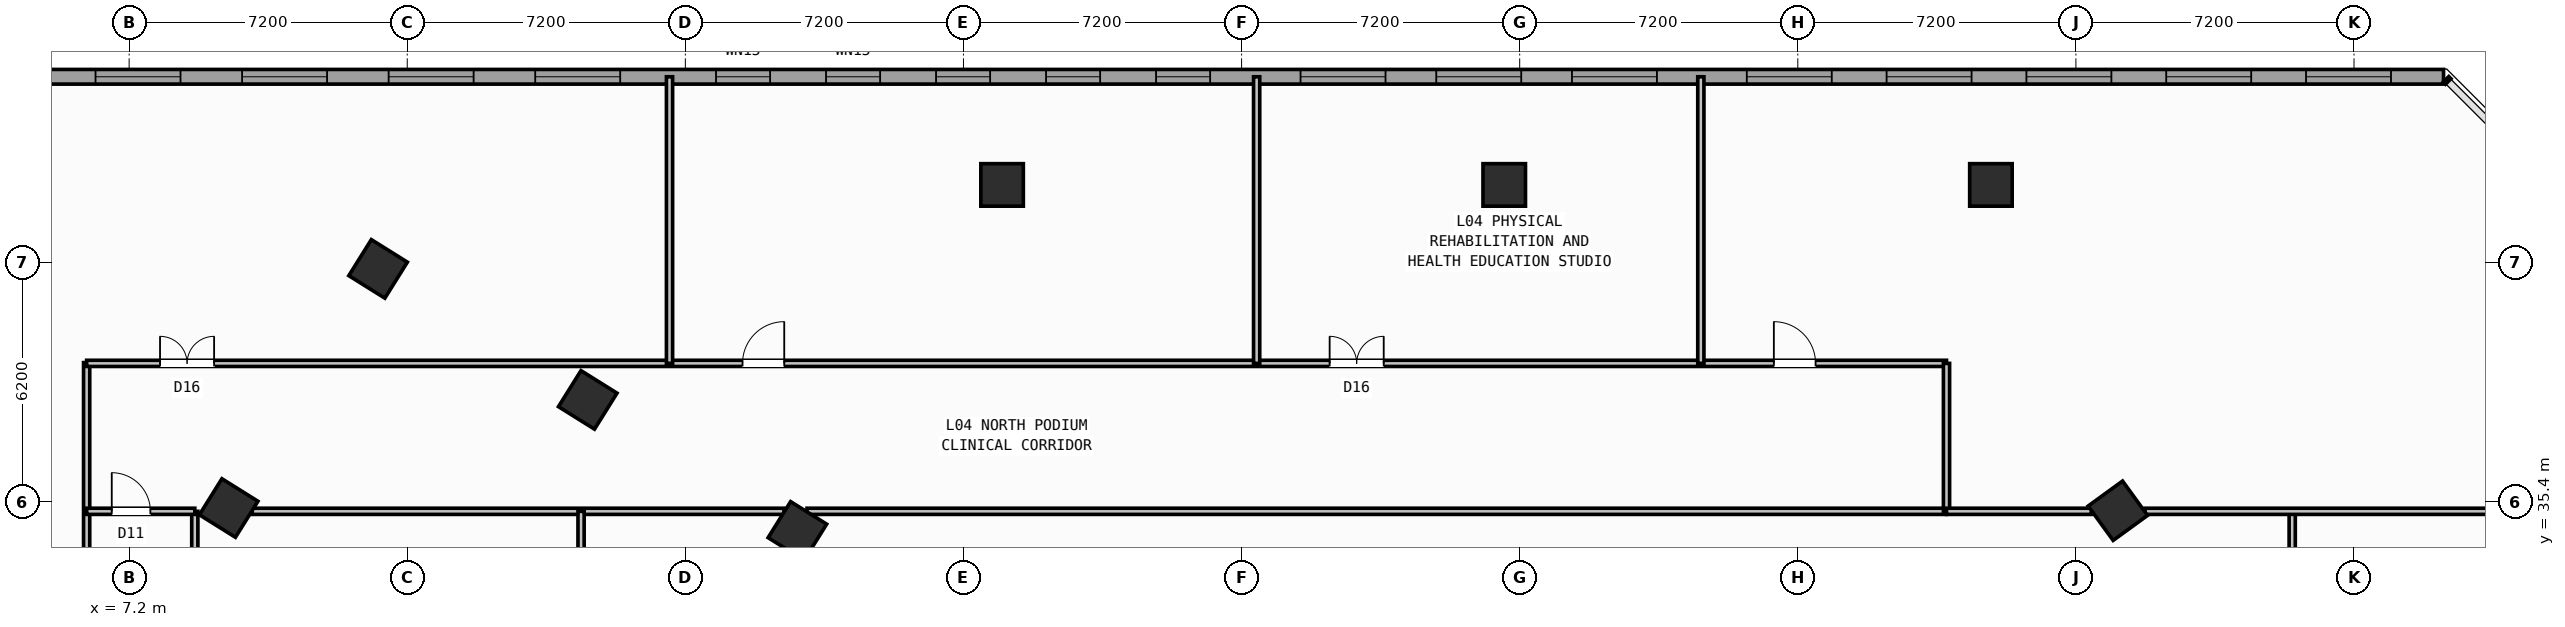
"""IFC4 building model, lengths in metres.
Left out: names, types, materials, properties, quantities, classifications, styles, units other than length and angle.
Written with IfcOpenShell. Run it as: python <this file> out.ifc"""

import sys

from ifc_helpers import new_model, si_unit, direction, frame, frame_2d, origin, origin_2d, place, context, subcontext, project, spatial, rectangle, hollow_rectangle, extrude, source, transform, mapped, element, fill, save


model = new_model("IFC4")
c1 = context("Model", 3, precision=1e-05, world=origin(), true_north=direction((0.0, 1.0)))
c2 = subcontext(c1, "Body", "Model", "MODEL_VIEW")
j1 = project(units=[si_unit("LENGTHUNIT", "METRE"), si_unit("PLANEANGLEUNIT", "RADIAN")], contexts=[c1])
p1 = place(None, origin())
s1 = spatial("IfcSite", under=j1, at=p1, CompositionType="ELEMENT")
p2 = place(p1, origin())
s2 = spatial("IfcBuilding", under=s1, at=p2, CompositionType="ELEMENT")
p3 = place(p2, frame((0.0, 0.0, 18.6)))
s3 = spatial("IfcBuildingStorey", under=s2, at=p3, CompositionType="ELEMENT", Elevation=18.6)
m1 = source(origin(), c2, "Body", "SweptSolid", [
    extrude(hollow_rectangle(XDim=1.1, YDim=1.1, WallThickness=0.04, at=origin_2d()), origin(), (0.0, 0.0, 1.0), 5.4),
])
for number, where, z_axis, x_axis in (
    (1, (29.8, 43.6, 0.0), (0.0, 0.0, 1.0), (1.0, 0.0, 0.0)),
    (2, (42.8, 43.6, 0.0), (0.0, 0.0, 1.0), (1.0, 0.0, 0.0)),
    (3, (55.4, 43.6, 0.0), (0.0, 0.0, 1.0), (1.0, 0.0, 0.0)),
    (4, (24.5, 34.643, 0.0), (0.0, 0.0, 1.0), (-0.848, 0.53, 0.0)),
    (5, (19.073, 38.034, 0.0), (0.0, 0.0, 1.0), (-0.848, 0.53, 0.0)),
    (6, (13.646, 41.426, 0.0), (0.0, 0.0, 1.0), (-0.848, 0.53, 0.0)),
    (7, (9.777, 35.235, 0.0), (0.0, 0.0, 1.0), (-0.848, 0.53, 0.0)),
    (8, (58.686, 35.165, 0.0), (0.0, 0.0, 1.0), (0.809, 0.588, 0.0)),
):
    element("IfcColumn", number, at=place(p3, frame(where, z_axis=z_axis, x_axis=x_axis)), inside=s3, PredefinedType="COLUMN", context=c2, shape_type="MappedRepresentation", body=[
        mapped(m1, transform((0.0, 0.0, 0.0), scale=1.0)),
    ])
p4 = place(p3, frame((4.883, 46.4, 0.0), z_axis=(0.0, 0.0, 1.0), x_axis=(1.0, 0.0, 0.0)))
e9 = element("IfcWall", 9, at=p4, inside=s3, PredefinedType="STANDARD", context=c2, shape_type="SweptSolid", body=[
    extrude(rectangle(XDim=62.234, YDim=0.38, at=frame_2d((31.117, 0.0))), origin(), (0.0, 0.0, 1.0), 4.95),
])
p5 = place(p4, frame((1.447, 0.0, 0.85)))
e10 = element("IfcOpeningElement", 10, at=p5, cuts=e9, PredefinedType="OPENING", context=c2, shape_type="SweptSolid", body=[
    extrude(rectangle(XDim=2.2, YDim=1.75, at=frame_2d((1.1, 0.875))), frame((0.0, 0.2, 0.0), z_axis=(0.0, -1.0, 0.0), x_axis=(1.0, 0.0, 0.0)), (0.0, 0.0, 1.0), 0.4),
])
p6 = place(p4, frame((5.241, 0.0, 0.85)))
e11 = element("IfcOpeningElement", 11, at=p6, cuts=e9, PredefinedType="OPENING", context=c2, shape_type="SweptSolid", body=[
    extrude(rectangle(XDim=2.2, YDim=1.75, at=frame_2d((1.1, 0.875))), frame((0.0, 0.2, 0.0), z_axis=(0.0, -1.0, 0.0), x_axis=(1.0, 0.0, 0.0)), (0.0, 0.0, 1.0), 0.4),
])
p7 = place(p4, frame((9.036, 0.0, 0.85)))
e12 = element("IfcOpeningElement", 12, at=p7, cuts=e9, PredefinedType="OPENING", context=c2, shape_type="SweptSolid", body=[
    extrude(rectangle(XDim=2.2, YDim=1.75, at=frame_2d((1.1, 0.875))), frame((0.0, 0.2, 0.0), z_axis=(0.0, -1.0, 0.0), x_axis=(1.0, 0.0, 0.0)), (0.0, 0.0, 1.0), 0.4),
])
p8 = place(p4, frame((12.83, 0.0, 0.85)))
e13 = element("IfcOpeningElement", 13, at=p8, cuts=e9, PredefinedType="OPENING", context=c2, shape_type="SweptSolid", body=[
    extrude(rectangle(XDim=2.2, YDim=1.75, at=frame_2d((1.1, 0.875))), frame((0.0, 0.2, 0.0), z_axis=(0.0, -1.0, 0.0), x_axis=(1.0, 0.0, 0.0)), (0.0, 0.0, 1.0), 0.4),
])
p9 = place(p4, frame((17.511, 0.0, 0.95)))
e14 = element("IfcOpeningElement", 14, at=p9, cuts=e9, PredefinedType="OPENING", context=c2, shape_type="SweptSolid", body=[
    extrude(rectangle(XDim=1.4, YDim=1.5, at=frame_2d((0.7, 0.75))), frame((0.0, 0.2, 0.0), z_axis=(0.0, -1.0, 0.0), x_axis=(1.0, 0.0, 0.0)), (0.0, 0.0, 1.0), 0.4),
])
p10 = place(p4, frame((20.359, 0.0, 0.95)))
e15 = element("IfcOpeningElement", 15, at=p10, cuts=e9, PredefinedType="OPENING", context=c2, shape_type="SweptSolid", body=[
    extrude(rectangle(XDim=1.4, YDim=1.5, at=frame_2d((0.7, 0.75))), frame((0.0, 0.2, 0.0), z_axis=(0.0, -1.0, 0.0), x_axis=(1.0, 0.0, 0.0)), (0.0, 0.0, 1.0), 0.4),
])
p11 = place(p4, frame((23.207, 0.0, 0.95)))
e16 = element("IfcOpeningElement", 16, at=p11, cuts=e9, PredefinedType="OPENING", context=c2, shape_type="SweptSolid", body=[
    extrude(rectangle(XDim=1.4, YDim=1.5, at=frame_2d((0.7, 0.75))), frame((0.0, 0.2, 0.0), z_axis=(0.0, -1.0, 0.0), x_axis=(1.0, 0.0, 0.0)), (0.0, 0.0, 1.0), 0.4),
])
p12 = place(p4, frame((26.055, 0.0, 0.95)))
e17 = element("IfcOpeningElement", 17, at=p12, cuts=e9, PredefinedType="OPENING", context=c2, shape_type="SweptSolid", body=[
    extrude(rectangle(XDim=1.4, YDim=1.5, at=frame_2d((0.7, 0.75))), frame((0.0, 0.2, 0.0), z_axis=(0.0, -1.0, 0.0), x_axis=(1.0, 0.0, 0.0)), (0.0, 0.0, 1.0), 0.4),
])
p13 = place(p4, frame((28.903, 0.0, 0.95)))
e18 = element("IfcOpeningElement", 18, at=p13, cuts=e9, PredefinedType="OPENING", context=c2, shape_type="SweptSolid", body=[
    extrude(rectangle(XDim=1.4, YDim=1.5, at=frame_2d((0.7, 0.75))), frame((0.0, 0.2, 0.0), z_axis=(0.0, -1.0, 0.0), x_axis=(1.0, 0.0, 0.0)), (0.0, 0.0, 1.0), 0.4),
])
p14 = place(p4, frame((32.644, 0.0, 0.85)))
e19 = element("IfcOpeningElement", 19, at=p14, cuts=e9, PredefinedType="OPENING", context=c2, shape_type="SweptSolid", body=[
    extrude(rectangle(XDim=2.2, YDim=1.75, at=frame_2d((1.1, 0.875))), frame((0.0, 0.2, 0.0), z_axis=(0.0, -1.0, 0.0), x_axis=(1.0, 0.0, 0.0)), (0.0, 0.0, 1.0), 0.4),
])
p15 = place(p4, frame((36.157, 0.0, 0.85)))
e20 = element("IfcOpeningElement", 20, at=p15, cuts=e9, PredefinedType="OPENING", context=c2, shape_type="SweptSolid", body=[
    extrude(rectangle(XDim=2.2, YDim=1.75, at=frame_2d((1.1, 0.875))), frame((0.0, 0.2, 0.0), z_axis=(0.0, -1.0, 0.0), x_axis=(1.0, 0.0, 0.0)), (0.0, 0.0, 1.0), 0.4),
])
p16 = place(p4, frame((39.67, 0.0, 0.85)))
e21 = element("IfcOpeningElement", 21, at=p16, cuts=e9, PredefinedType="OPENING", context=c2, shape_type="SweptSolid", body=[
    extrude(rectangle(XDim=2.2, YDim=1.75, at=frame_2d((1.1, 0.875))), frame((0.0, 0.2, 0.0), z_axis=(0.0, -1.0, 0.0), x_axis=(1.0, 0.0, 0.0)), (0.0, 0.0, 1.0), 0.4),
])
p17 = place(p4, frame((44.197, 0.0, 0.85)))
e22 = element("IfcOpeningElement", 22, at=p17, cuts=e9, PredefinedType="OPENING", context=c2, shape_type="SweptSolid", body=[
    extrude(rectangle(XDim=2.2, YDim=1.75, at=frame_2d((1.1, 0.875))), frame((0.0, 0.2, 0.0), z_axis=(0.0, -1.0, 0.0), x_axis=(1.0, 0.0, 0.0)), (0.0, 0.0, 1.0), 0.4),
])
p18 = place(p4, frame((47.816, 0.0, 0.85)))
e23 = element("IfcOpeningElement", 23, at=p18, cuts=e9, PredefinedType="OPENING", context=c2, shape_type="SweptSolid", body=[
    extrude(rectangle(XDim=2.2, YDim=1.75, at=frame_2d((1.1, 0.875))), frame((0.0, 0.2, 0.0), z_axis=(0.0, -1.0, 0.0), x_axis=(1.0, 0.0, 0.0)), (0.0, 0.0, 1.0), 0.4),
])
p19 = place(p4, frame((51.436, 0.0, 0.85)))
e24 = element("IfcOpeningElement", 24, at=p19, cuts=e9, PredefinedType="OPENING", context=c2, shape_type="SweptSolid", body=[
    extrude(rectangle(XDim=2.2, YDim=1.75, at=frame_2d((1.1, 0.875))), frame((0.0, 0.2, 0.0), z_axis=(0.0, -1.0, 0.0), x_axis=(1.0, 0.0, 0.0)), (0.0, 0.0, 1.0), 0.4),
])
p20 = place(p4, frame((55.055, 0.0, 0.85)))
e25 = element("IfcOpeningElement", 25, at=p20, cuts=e9, PredefinedType="OPENING", context=c2, shape_type="SweptSolid", body=[
    extrude(rectangle(XDim=2.2, YDim=1.75, at=frame_2d((1.1, 0.875))), frame((0.0, 0.2, 0.0), z_axis=(0.0, -1.0, 0.0), x_axis=(1.0, 0.0, 0.0)), (0.0, 0.0, 1.0), 0.4),
])
p21 = place(p4, frame((58.675, 0.0, 0.85)))
e26 = element("IfcOpeningElement", 26, at=p21, cuts=e9, PredefinedType="OPENING", context=c2, shape_type="SweptSolid", body=[
    extrude(rectangle(XDim=2.2, YDim=1.75, at=frame_2d((1.1, 0.875))), frame((0.0, 0.2, 0.0), z_axis=(0.0, -1.0, 0.0), x_axis=(1.0, 0.0, 0.0)), (0.0, 0.0, 1.0), 0.4),
])
p22 = place(p3, frame((6.1, 29.587, 0.0), z_axis=(0.0, 0.0, 1.0), x_axis=(0.0, 1.0, 0.0)))
e27 = element("IfcWall", 27, at=p22, inside=s3, PredefinedType="PARTITIONING", context=c2, shape_type="SweptSolid", body=[
    extrude(rectangle(XDim=9.413, YDim=0.16, at=frame_2d((4.706, 0.0))), origin(), (0.0, 0.0, 1.0), 4.94),
])
p23 = place(p3, frame((8.9, 9.58, 0.0), z_axis=(0.0, 0.0, 1.0), x_axis=(0.0, 1.0, 0.0)))
e28 = element("IfcWall", 28, at=p23, inside=s3, PredefinedType="PARTITIONING", context=c2, shape_type="SweptSolid", body=[
    extrude(rectangle(XDim=25.57, YDim=0.16, at=frame_2d((12.785, 0.0))), origin(), (0.0, 0.0, 1.0), 4.94),
])
p24 = place(p3, frame((10.386, 35.15, 0.0), z_axis=(0.0, 0.0, 1.0), x_axis=(1.0, 0.0, 0.0)))
e29 = element("IfcWall", 29, at=p24, inside=s3, PredefinedType="PARTITIONING", context=c2, shape_type="SweptSolid", body=[
    extrude(rectangle(XDim=13.768, YDim=0.16, at=frame_2d((6.884, 0.0))), origin(), (0.0, 0.0, 1.0), 4.94),
])
p25 = place(p3, frame((24.749, 35.15, 0.0), z_axis=(0.0, 0.0, 1.0), x_axis=(1.0, 0.0, 0.0)))
e30 = element("IfcWall", 30, at=p25, inside=s3, PredefinedType="PARTITIONING", context=c2, shape_type="SweptSolid", body=[
    extrude(rectangle(XDim=29.501, YDim=0.16, at=frame_2d((14.75, 0.0))), origin(), (0.0, 0.0, 1.0), 4.94),
])
p26 = place(p3, frame((6.1, 38.98, 0.0), z_axis=(0.0, 0.0, 1.0), x_axis=(1.0, 0.0, 0.0)))
e31 = element("IfcWall", 31, at=p26, inside=s3, PredefinedType="PARTITIONING", context=c2, shape_type="SweptSolid", body=[
    extrude(rectangle(XDim=48.15, YDim=0.16, at=frame_2d((24.075, 0.0))), origin(), (0.0, 0.0, 1.0), 4.94),
])
p27 = place(p26, frame((1.9, 0.0, 0.0)))
e32 = element("IfcOpeningElement", 32, at=p27, cuts=e31, PredefinedType="OPENING", context=c2, shape_type="SweptSolid", body=[
    extrude(rectangle(XDim=1.4, YDim=2.15, at=frame_2d((0.7, 1.075))), frame((0.0, 0.09, 0.0), z_axis=(0.0, -1.0, 0.0), x_axis=(1.0, 0.0, 0.0)), (0.0, 0.0, 1.0), 0.18),
])
p28 = place(p26, frame((16.98, 0.0, 0.0)))
e33 = element("IfcOpeningElement", 33, at=p28, cuts=e31, PredefinedType="OPENING", context=c2, shape_type="SweptSolid", body=[
    extrude(rectangle(XDim=1.08, YDim=2.15, at=frame_2d((0.54, 1.075))), frame((0.0, 0.09, 0.0), z_axis=(0.0, -1.0, 0.0), x_axis=(1.0, 0.0, 0.0)), (0.0, 0.0, 1.0), 0.18),
])
p29 = place(p26, frame((32.18, 0.0, 0.0)))
e34 = element("IfcOpeningElement", 34, at=p29, cuts=e31, PredefinedType="OPENING", context=c2, shape_type="SweptSolid", body=[
    extrude(rectangle(XDim=1.4, YDim=2.15, at=frame_2d((0.7, 1.075))), frame((0.0, 0.09, 0.0), z_axis=(0.0, -1.0, 0.0), x_axis=(1.0, 0.0, 0.0)), (0.0, 0.0, 1.0), 0.18),
])
p30 = place(p26, frame((43.68, 0.0, 0.0)))
e35 = element("IfcOpeningElement", 35, at=p30, cuts=e31, PredefinedType="OPENING", context=c2, shape_type="SweptSolid", body=[
    extrude(rectangle(XDim=1.08, YDim=2.15, at=frame_2d((0.54, 1.075))), frame((0.0, 0.09, 0.0), z_axis=(0.0, -1.0, 0.0), x_axis=(1.0, 0.0, 0.0)), (0.0, 0.0, 1.0), 0.18),
])
p31 = place(p3, frame((54.25, 35.15, 0.0), z_axis=(0.0, 0.0, 1.0), x_axis=(0.0, 1.0, 0.0)))
e36 = element("IfcWall", 36, at=p31, inside=s3, PredefinedType="PARTITIONING", context=c2, shape_type="SweptSolid", body=[
    extrude(rectangle(XDim=3.83, YDim=0.16, at=frame_2d((1.915, 0.0))), origin(), (0.0, 0.0, 1.0), 4.94),
])
p32 = place(p3, frame((6.1, 35.15, 0.0), z_axis=(0.0, 0.0, 1.0), x_axis=(1.0, 0.0, 0.0)))
e37 = element("IfcWall", 37, at=p32, inside=s3, PredefinedType="PARTITIONING", context=c2, shape_type="SweptSolid", body=[
    extrude(rectangle(XDim=2.8, YDim=0.16, at=frame_2d((1.4, 0.0))), origin(), (0.0, 0.0, 1.0), 4.94),
])
p33 = place(p32, frame((0.65, 0.0, 0.0)))
e38 = element("IfcOpeningElement", 38, at=p33, cuts=e37, PredefinedType="OPENING", context=c2, shape_type="SweptSolid", body=[
    extrude(rectangle(XDim=1.0, YDim=2.1, at=frame_2d((0.5, 1.05))), frame((0.0, 0.09, 0.0), z_axis=(0.0, -1.0, 0.0), x_axis=(1.0, 0.0, 0.0)), (0.0, 0.0, 1.0), 0.18),
])
for number, where, z_axis, x_axis in (
    (39, (21.19, 38.98, 0.0), (0.0, 0.0, 1.0), (0.0, 1.0, 0.0)),
    (40, (36.39, 38.98, 0.0), (0.0, 0.0, 1.0), (0.0, 1.0, 0.0)),
    (41, (47.89, 38.98, 0.0), (0.0, 0.0, 1.0), (0.0, 1.0, 0.0)),
):
    element("IfcWall", number, at=place(p3, frame(where, z_axis=z_axis, x_axis=x_axis)), inside=s3, PredefinedType="PARTITIONING", context=c2, shape_type="SweptSolid", body=[
        extrude(rectangle(XDim=7.42, YDim=0.16, at=frame_2d((3.71, 0.0))), origin(), (0.0, 0.0, 1.0), 4.94),
    ])
p34 = place(p3, frame((18.9, 9.58, 0.0), z_axis=(0.0, 0.0, 1.0), x_axis=(0.0, 1.0, 0.0)))
e42 = element("IfcWall", 42, at=p34, inside=s3, PredefinedType="PARTITIONING", context=c2, shape_type="SweptSolid", body=[
    extrude(rectangle(XDim=25.57, YDim=0.16, at=frame_2d((12.785, 0.0))), origin(), (0.0, 0.0, 1.0), 4.94),
])
p35 = place(p3, frame((63.2, 29.908, 0.0), z_axis=(0.0, 0.0, 1.0), x_axis=(0.0, 1.0, 0.0)))
e43 = element("IfcWall", 43, at=p35, inside=s3, PredefinedType="PARTITIONING", context=c2, shape_type="SweptSolid", body=[
    extrude(rectangle(XDim=5.241, YDim=0.16, at=frame_2d((2.621, 0.0))), origin(), (0.0, 0.0, 1.0), 4.94),
])
p36 = place(p3, frame((54.25, 35.15, 0.0), z_axis=(0.0, 0.0, 1.0), x_axis=(1.0, 0.0, 0.0)))
e44 = element("IfcWall", 44, at=p36, inside=s3, PredefinedType="PARTITIONING", context=c2, shape_type="SweptSolid", body=[
    extrude(rectangle(XDim=3.752, YDim=0.16, at=frame_2d((1.876, 0.0))), origin(), (0.0, 0.0, 1.0), 4.94),
])
p37 = place(p3, frame((59.392, 35.15, 0.0), z_axis=(0.0, 0.0, 1.0), x_axis=(1.0, 0.0, 0.0)))
e45 = element("IfcWall", 45, at=p37, inside=s3, PredefinedType="PARTITIONING", context=c2, shape_type="SweptSolid", body=[
    extrude(rectangle(XDim=11.008, YDim=0.16, at=frame_2d((5.504, 0.0))), origin(), (0.0, 0.0, 1.0), 4.94),
])
m2 = source(origin(), c2, "Body", "SweptSolid", [
    extrude(rectangle(XDim=2.2, YDim=1.75, at=frame_2d((1.1, 0.875))), frame((0.0, 0.03, 0.0), z_axis=(0.0, -1.0, 0.0), x_axis=(1.0, 0.0, 0.0)), (0.0, 0.0, 1.0), 0.06),
])
p38 = place(p5, origin())
e46 = element("IfcWindow", 46, at=p38, inside=s3, PartitioningType="SINGLE_PANEL", PredefinedType="WINDOW", context=c2, shape_type="MappedRepresentation", body=[
    mapped(m2, transform((0.0, 0.0, 0.0), scale=1.0)),
])
fill(e10, e46)
p39 = place(p6, origin())
e47 = element("IfcWindow", 47, at=p39, inside=s3, PartitioningType="SINGLE_PANEL", PredefinedType="WINDOW", context=c2, shape_type="MappedRepresentation", body=[
    mapped(m2, transform((0.0, 0.0, 0.0), scale=1.0)),
])
fill(e11, e47)
p40 = place(p7, origin())
e48 = element("IfcWindow", 48, at=p40, inside=s3, PartitioningType="SINGLE_PANEL", PredefinedType="WINDOW", context=c2, shape_type="MappedRepresentation", body=[
    mapped(m2, transform((0.0, 0.0, 0.0), scale=1.0)),
])
fill(e12, e48)
p41 = place(p8, origin())
e49 = element("IfcWindow", 49, at=p41, inside=s3, PartitioningType="SINGLE_PANEL", PredefinedType="WINDOW", context=c2, shape_type="MappedRepresentation", body=[
    mapped(m2, transform((0.0, 0.0, 0.0), scale=1.0)),
])
fill(e13, e49)
m3 = source(origin(), c2, "Body", "SweptSolid", [
    extrude(rectangle(XDim=1.4, YDim=1.5, at=frame_2d((0.7, 0.75))), frame((0.0, 0.03, 0.0), z_axis=(0.0, -1.0, 0.0), x_axis=(1.0, 0.0, 0.0)), (0.0, 0.0, 1.0), 0.06),
])
p42 = place(p9, origin())
e50 = element("IfcWindow", 50, at=p42, inside=s3, PartitioningType="SINGLE_PANEL", PredefinedType="WINDOW", context=c2, shape_type="MappedRepresentation", body=[
    mapped(m3, transform((0.0, 0.0, 0.0), scale=1.0)),
])
fill(e14, e50)
p43 = place(p10, origin())
e51 = element("IfcWindow", 51, at=p43, inside=s3, PartitioningType="SINGLE_PANEL", PredefinedType="WINDOW", context=c2, shape_type="MappedRepresentation", body=[
    mapped(m3, transform((0.0, 0.0, 0.0), scale=1.0)),
])
fill(e15, e51)
p44 = place(p11, origin())
e52 = element("IfcWindow", 52, at=p44, inside=s3, PartitioningType="SINGLE_PANEL", PredefinedType="WINDOW", context=c2, shape_type="MappedRepresentation", body=[
    mapped(m3, transform((0.0, 0.0, 0.0), scale=1.0)),
])
fill(e16, e52)
p45 = place(p12, origin())
e53 = element("IfcWindow", 53, at=p45, inside=s3, PartitioningType="SINGLE_PANEL", PredefinedType="WINDOW", context=c2, shape_type="MappedRepresentation", body=[
    mapped(m3, transform((0.0, 0.0, 0.0), scale=1.0)),
])
fill(e17, e53)
p46 = place(p13, origin())
e54 = element("IfcWindow", 54, at=p46, inside=s3, PartitioningType="SINGLE_PANEL", PredefinedType="WINDOW", context=c2, shape_type="MappedRepresentation", body=[
    mapped(m3, transform((0.0, 0.0, 0.0), scale=1.0)),
])
fill(e18, e54)
p47 = place(p14, origin())
e55 = element("IfcWindow", 55, at=p47, inside=s3, PartitioningType="SINGLE_PANEL", PredefinedType="WINDOW", context=c2, shape_type="MappedRepresentation", body=[
    mapped(m2, transform((0.0, 0.0, 0.0), scale=1.0)),
])
fill(e19, e55)
p48 = place(p15, origin())
e56 = element("IfcWindow", 56, at=p48, inside=s3, PartitioningType="SINGLE_PANEL", PredefinedType="WINDOW", context=c2, shape_type="MappedRepresentation", body=[
    mapped(m2, transform((0.0, 0.0, 0.0), scale=1.0)),
])
fill(e20, e56)
p49 = place(p16, origin())
e57 = element("IfcWindow", 57, at=p49, inside=s3, PartitioningType="SINGLE_PANEL", PredefinedType="WINDOW", context=c2, shape_type="MappedRepresentation", body=[
    mapped(m2, transform((0.0, 0.0, 0.0), scale=1.0)),
])
fill(e21, e57)
p50 = place(p17, origin())
e58 = element("IfcWindow", 58, at=p50, inside=s3, PartitioningType="SINGLE_PANEL", PredefinedType="WINDOW", context=c2, shape_type="MappedRepresentation", body=[
    mapped(m2, transform((0.0, 0.0, 0.0), scale=1.0)),
])
fill(e22, e58)
p51 = place(p18, origin())
e59 = element("IfcWindow", 59, at=p51, inside=s3, PartitioningType="SINGLE_PANEL", PredefinedType="WINDOW", context=c2, shape_type="MappedRepresentation", body=[
    mapped(m2, transform((0.0, 0.0, 0.0), scale=1.0)),
])
fill(e23, e59)
p52 = place(p19, origin())
e60 = element("IfcWindow", 60, at=p52, inside=s3, PartitioningType="SINGLE_PANEL", PredefinedType="WINDOW", context=c2, shape_type="MappedRepresentation", body=[
    mapped(m2, transform((0.0, 0.0, 0.0), scale=1.0)),
])
fill(e24, e60)
p53 = place(p20, origin())
e61 = element("IfcWindow", 61, at=p53, inside=s3, PartitioningType="SINGLE_PANEL", PredefinedType="WINDOW", context=c2, shape_type="MappedRepresentation", body=[
    mapped(m2, transform((0.0, 0.0, 0.0), scale=1.0)),
])
fill(e25, e61)
p54 = place(p21, origin())
e62 = element("IfcWindow", 62, at=p54, inside=s3, PartitioningType="SINGLE_PANEL", PredefinedType="WINDOW", context=c2, shape_type="MappedRepresentation", body=[
    mapped(m2, transform((0.0, 0.0, 0.0), scale=1.0)),
])
fill(e26, e62)
m4 = source(origin(), c2, "Body", "SweptSolid", [
    extrude(rectangle(XDim=1.0, YDim=2.1, at=frame_2d((0.5, 1.05))), frame((0.0, 0.025, 0.0), z_axis=(0.0, -1.0, 0.0), x_axis=(1.0, 0.0, 0.0)), (0.0, 0.0, 1.0), 0.05),
])
p55 = place(p33, origin())
e63 = element("IfcDoor", 63, at=p55, inside=s3, OperationType="SINGLE_SWING_LEFT", PredefinedType="DOOR", context=c2, shape_type="MappedRepresentation", body=[
    mapped(m4, transform((0.0, 0.0, 0.0), scale=1.0)),
])
fill(e38, e63)
m5 = source(origin(), c2, "Body", "SweptSolid", [
    extrude(rectangle(XDim=1.4, YDim=2.15, at=frame_2d((0.7, 1.075))), frame((0.0, 0.025, 0.0), z_axis=(0.0, -1.0, 0.0), x_axis=(1.0, 0.0, 0.0)), (0.0, 0.0, 1.0), 0.05),
])
p56 = place(p27, origin())
e64 = element("IfcDoor", 64, at=p56, inside=s3, OperationType="DOUBLE_DOOR_SINGLE_SWING", PredefinedType="DOOR", context=c2, shape_type="MappedRepresentation", body=[
    mapped(m5, transform((0.0, 0.0, 0.0), scale=1.0)),
])
fill(e32, e64)
m6 = source(origin(), c2, "Body", "SweptSolid", [
    extrude(rectangle(XDim=1.08, YDim=2.15, at=frame_2d((0.54, 1.075))), frame((0.0, 0.025, 0.0), z_axis=(0.0, -1.0, 0.0), x_axis=(1.0, 0.0, 0.0)), (0.0, 0.0, 1.0), 0.05),
])
p57 = place(p28, origin())
e65 = element("IfcDoor", 65, at=p57, inside=s3, OperationType="SINGLE_SWING_RIGHT", PredefinedType="DOOR", context=c2, shape_type="MappedRepresentation", body=[
    mapped(m6, transform((0.0, 0.0, 0.0), scale=1.0)),
])
fill(e33, e65)
p58 = place(p29, origin())
e66 = element("IfcDoor", 66, at=p58, inside=s3, OperationType="DOUBLE_DOOR_SINGLE_SWING", PredefinedType="DOOR", context=c2, shape_type="MappedRepresentation", body=[
    mapped(m5, transform((0.0, 0.0, 0.0), scale=1.0)),
])
fill(e34, e66)
p59 = place(p30, origin())
e67 = element("IfcDoor", 67, at=p59, inside=s3, OperationType="SINGLE_SWING_LEFT", PredefinedType="DOOR", context=c2, shape_type="MappedRepresentation", body=[
    mapped(m6, transform((0.0, 0.0, 0.0), scale=1.0)),
])
fill(e35, e67)
save(model, sys.argv[1])
